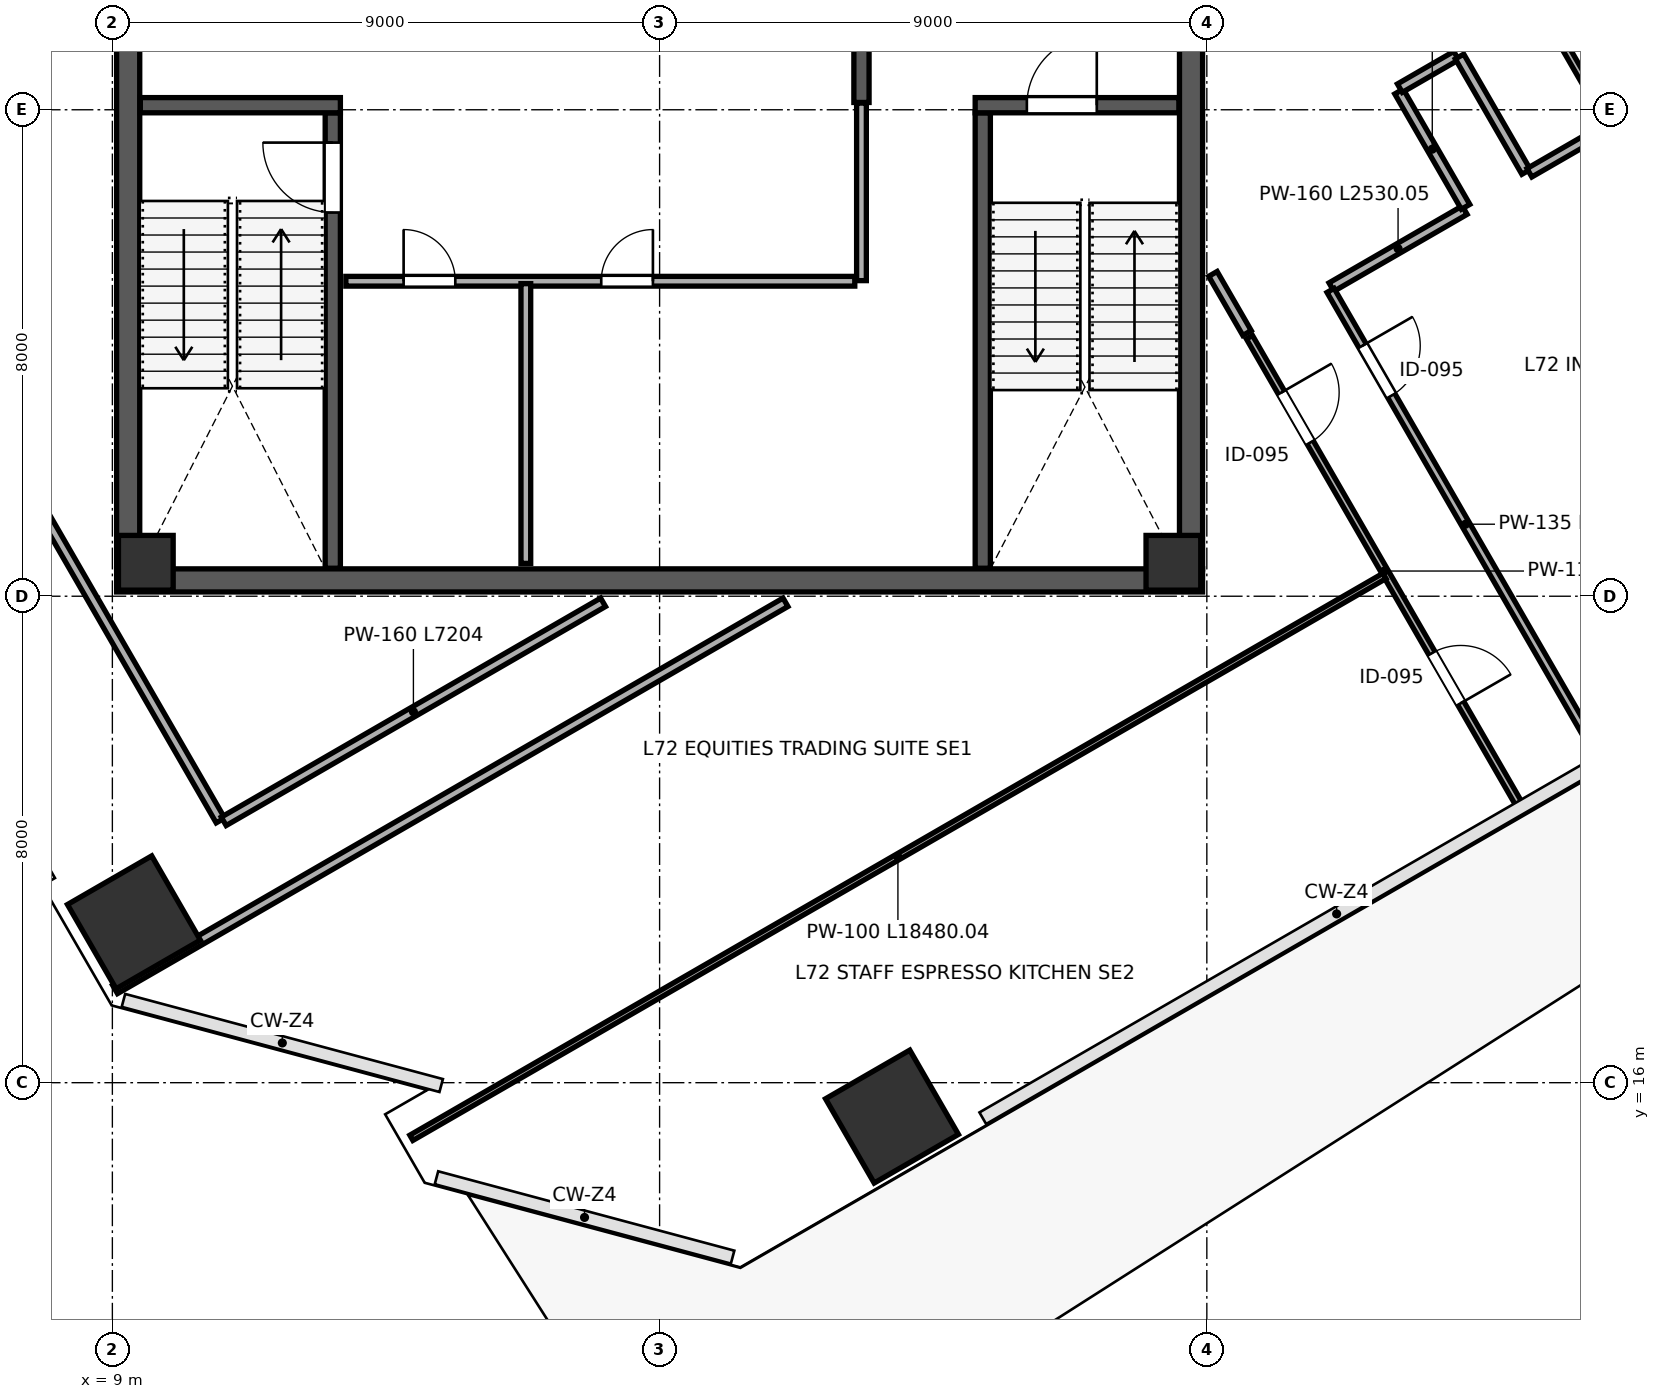
"""IFC4 building model, lengths in metres.
Left out: names, types, materials, properties, quantities, classifications, styles, units other than length and angle.
Written with IfcOpenShell. Run it as: python <this file> out.ifc"""

import sys

from ifc_helpers import new_model, si_unit, direction, frame, frame_2d, origin, origin_2d, place, context, subcontext, project, spatial, rectangle, extrude, source, transform, mapped, element, fill, save


model = new_model("IFC4")
c1 = context("Model", 3, precision=1e-05, world=origin(), true_north=direction((0.0, 1.0)))
c2 = subcontext(c1, "Body", "Model", "MODEL_VIEW")
j1 = project(units=[si_unit("LENGTHUNIT", "METRE"), si_unit("PLANEANGLEUNIT", "RADIAN")], contexts=[c1])
p1 = place(None, origin())
s1 = spatial("IfcSite", under=j1, at=p1, CompositionType="ELEMENT")
p2 = place(p1, origin())
s2 = spatial("IfcBuilding", under=s1, at=p2, CompositionType="ELEMENT")
p3 = place(p2, frame((0.0, 0.0, 319.8)))
s3 = spatial("IfcBuildingStorey", under=s2, at=p3, CompositionType="ELEMENT", Elevation=319.8)
m1 = source(origin(), c2, "Body", "SweptSolid", [
    extrude(rectangle(XDim=0.9, YDim=0.9, at=origin_2d()), origin(), (0.0, 0.0, 1.0), 4.198),
])
for number, where, z_axis, x_axis in (
    (1, (9.55, 24.55, 0.001), (0.0, 0.0, 1.0), (1.0, 0.0, 0.0)),
    (2, (26.45, 24.55, 0.001), (0.0, 0.0, 1.0), (1.0, 0.0, 0.0)),
):
    element("IfcColumn", number, at=place(p3, frame(where, z_axis=z_axis, x_axis=x_axis)), inside=s3, PredefinedType="COLUMN", context=c2, shape_type="MappedRepresentation", body=[
        mapped(m1, transform((0.0, 0.0, 0.0), scale=1.0)),
    ])
m2 = source(origin(), c2, "Body", "SweptSolid", [
    extrude(rectangle(XDim=1.6, YDim=1.6, at=origin_2d()), origin(), (0.0, 0.0, 1.0), 4.198),
])
for number, where, z_axis, x_axis in (
    (3, (9.354, 18.637, 0.001), (0.0, 0.0, 1.0), (-0.5, 0.866, 0.0)),
    (4, (21.822, 15.443, 0.001), (0.0, 0.0, 1.0), (-0.5, 0.866, 0.0)),
):
    element("IfcColumn", number, at=place(p3, frame(where, z_axis=z_axis, x_axis=x_axis)), inside=s3, PredefinedType="COLUMN", context=c2, shape_type="MappedRepresentation", body=[
        mapped(m2, transform((0.0, 0.0, 0.0), scale=1.0)),
    ])
p4 = place(p3, frame((9.26, 24.45, 0.0), z_axis=(0.0, 0.0, 1.0), x_axis=(0.0, 1.0, 0.0)))
e5 = element("IfcWall", 5, at=p4, inside=s3, PredefinedType="SHEAR", context=c2, shape_type="SweptSolid", body=[
    extrude(rectangle(XDim=15.1, YDim=0.38, at=frame_2d((7.55, 0.0))), origin(), (0.0, 0.0, 1.0), 3.96),
])
p5 = place(p4, frame((8.7, 0.0, 0.0)))
e6 = element("IfcOpeningElement", 6, at=p5, cuts=e5, PredefinedType="OPENING", context=c2, shape_type="SweptSolid", body=[
    extrude(rectangle(XDim=1.15, YDim=2.2, at=frame_2d((0.575, 1.1))), frame((0.0, 0.2, 0.0), z_axis=(0.0, -1.0, 0.0), x_axis=(1.0, 0.0, 0.0)), (0.0, 0.0, 1.0), 0.4),
])
p6 = place(p3, frame((26.74, 24.45, 0.0), z_axis=(0.0, 0.0, 1.0), x_axis=(0.0, 1.0, 0.0)))
e7 = element("IfcWall", 7, at=p6, inside=s3, PredefinedType="SHEAR", context=c2, shape_type="SweptSolid", body=[
    extrude(rectangle(XDim=15.1, YDim=0.38, at=frame_2d((7.55, 0.0))), origin(), (0.0, 0.0, 1.0), 3.96),
])
p7 = place(p6, frame((8.6, 0.0, 0.0)))
e8 = element("IfcOpeningElement", 8, at=p7, cuts=e7, PredefinedType="OPENING", context=c2, shape_type="SweptSolid", body=[
    extrude(rectangle(XDim=1.15, YDim=2.2, at=frame_2d((0.575, 1.1))), frame((0.0, 0.2, 0.0), z_axis=(0.0, -1.0, 0.0), x_axis=(1.0, 0.0, 0.0)), (0.0, 0.0, 1.0), 0.4),
])
p8 = place(p3, frame((9.07, 24.26, 0.0), z_axis=(0.0, 0.0, 1.0), x_axis=(1.0, 0.0, 0.0)))
e9 = element("IfcWall", 9, at=p8, inside=s3, PredefinedType="SHEAR", context=c2, shape_type="SweptSolid", body=[
    extrude(rectangle(XDim=17.86, YDim=0.38, at=frame_2d((8.93, 0.0))), origin(), (0.0, 0.0, 1.0), 3.96),
])
p9 = place(p3, frame((12.625, 24.46, 0.0), z_axis=(0.0, 0.0, 1.0), x_axis=(0.0, 1.0, 0.0)))
e10 = element("IfcWall", 10, at=p9, inside=s3, PredefinedType="SHEAR", context=c2, shape_type="SweptSolid", body=[
    extrude(rectangle(XDim=7.49, YDim=0.25, at=frame_2d((3.745, 0.0))), origin(), (0.0, 0.0, 1.0), 3.96),
])
p10 = place(p9, frame((5.85, 0.0, 0.0)))
e11 = element("IfcOpeningElement", 11, at=p10, cuts=e10, PredefinedType="OPENING", context=c2, shape_type="SweptSolid", body=[
    extrude(rectangle(XDim=1.15, YDim=2.2, at=frame_2d((0.575, 1.1))), frame((0.0, 0.135, 0.0), z_axis=(0.0, -1.0, 0.0), x_axis=(1.0, 0.0, 0.0)), (0.0, 0.0, 1.0), 0.27),
])
p11 = place(p3, frame((9.46, 32.075, 0.0), z_axis=(0.0, 0.0, 1.0), x_axis=(1.0, 0.0, 0.0)))
e12 = element("IfcWall", 12, at=p11, inside=s3, PredefinedType="SHEAR", context=c2, shape_type="SweptSolid", body=[
    extrude(rectangle(XDim=3.29, YDim=0.25, at=frame_2d((1.645, 0.0))), origin(), (0.0, 0.0, 1.0), 3.96),
])
p12 = place(p3, frame((23.315, 24.46, 0.0), z_axis=(0.0, 0.0, 1.0), x_axis=(0.0, 1.0, 0.0)))
e13 = element("IfcWall", 13, at=p12, inside=s3, PredefinedType="SHEAR", context=c2, shape_type="SweptSolid", body=[
    extrude(rectangle(XDim=7.49, YDim=0.25, at=frame_2d((3.745, 0.0))), origin(), (0.0, 0.0, 1.0), 3.96),
])
p13 = place(p3, frame((23.19, 32.075, 0.0), z_axis=(0.0, 0.0, 1.0), x_axis=(1.0, 0.0, 0.0)))
e14 = element("IfcWall", 14, at=p13, inside=s3, PredefinedType="SHEAR", context=c2, shape_type="SweptSolid", body=[
    extrude(rectangle(XDim=3.35, YDim=0.25, at=frame_2d((1.675, 0.0))), origin(), (0.0, 0.0, 1.0), 3.96),
])
p14 = place(p13, frame((0.85, 0.0, 0.0)))
e15 = element("IfcOpeningElement", 15, at=p14, cuts=e14, PredefinedType="OPENING", context=c2, shape_type="SweptSolid", body=[
    extrude(rectangle(XDim=1.15, YDim=2.2, at=frame_2d((0.575, 1.1))), frame((0.0, 0.135, 0.0), z_axis=(0.0, -1.0, 0.0), x_axis=(1.0, 0.0, 0.0)), (0.0, 0.0, 1.0), 0.27),
])
p15 = place(p3, frame((21.32, 32.12, 0.0), z_axis=(0.0, 0.0, 1.0), x_axis=(0.0, 1.0, 0.0)))
e16 = element("IfcWall", 16, at=p15, inside=s3, PredefinedType="SHEAR", context=c2, shape_type="SweptSolid", body=[
    extrude(rectangle(XDim=7.42, YDim=0.25, at=frame_2d((3.71, 0.0))), origin(), (0.0, 0.0, 1.0), 3.96),
])
p16 = place(p15, frame((1.4, 0.0, 0.0)))
e17 = element("IfcOpeningElement", 17, at=p16, cuts=e16, PredefinedType="OPENING", context=c2, shape_type="SweptSolid", body=[
    extrude(rectangle(XDim=1.15, YDim=2.2, at=frame_2d((0.575, 1.1))), frame((0.0, 0.135, 0.0), z_axis=(0.0, -1.0, 0.0), x_axis=(1.0, 0.0, 0.0)), (0.0, 0.0, 1.0), 0.27),
])
p17 = place(p3, frame((12.84, 29.18, 0.0), z_axis=(0.0, 0.0, 1.0), x_axis=(1.0, 0.0, 0.0)))
e18 = element("IfcWall", 18, at=p17, inside=s3, PredefinedType="PARTITIONING", context=c2, shape_type="SweptSolid", body=[
    extrude(rectangle(XDim=8.37, YDim=0.16, at=frame_2d((4.185, 0.0))), origin(), (0.0, 0.0, 1.0), 3.96),
])
p18 = place(p17, frame((0.95, 0.0, 0.0)))
e19 = element("IfcOpeningElement", 19, at=p18, cuts=e18, PredefinedType="OPENING", context=c2, shape_type="SweptSolid", body=[
    extrude(rectangle(XDim=0.85, YDim=2.1, at=frame_2d((0.425, 1.05))), frame((0.0, 0.09, 0.0), z_axis=(0.0, -1.0, 0.0), x_axis=(1.0, 0.0, 0.0)), (0.0, 0.0, 1.0), 0.18),
])
p19 = place(p17, frame((4.2, 0.0, 0.0)))
e20 = element("IfcOpeningElement", 20, at=p19, cuts=e18, PredefinedType="OPENING", context=c2, shape_type="SweptSolid", body=[
    extrude(rectangle(XDim=0.85, YDim=2.1, at=frame_2d((0.425, 1.05))), frame((0.0, 0.09, 0.0), z_axis=(0.0, -1.0, 0.0), x_axis=(1.0, 0.0, 0.0)), (0.0, 0.0, 1.0), 0.18),
])
p20 = place(p3, frame((15.8, 24.54, 0.0), z_axis=(0.0, 0.0, 1.0), x_axis=(0.0, 1.0, 0.0)))
e21 = element("IfcWall", 21, at=p20, inside=s3, PredefinedType="PARTITIONING", context=c2, shape_type="SweptSolid", body=[
    extrude(rectangle(XDim=4.6, YDim=0.16, at=frame_2d((2.3, 0.0))), origin(), (0.0, 0.0, 1.0), 3.96),
])
p21 = place(p3, frame((21.32, 29.19, 0.0), z_axis=(0.0, 0.0, 1.0), x_axis=(0.0, 1.0, 0.0)))
e22 = element("IfcWall", 22, at=p21, inside=s3, PredefinedType="PARTITIONING", context=c2, shape_type="SweptSolid", body=[
    extrude(rectangle(XDim=2.92, YDim=0.16, at=frame_2d((1.46, 0.0))), origin(), (0.0, 0.0, 1.0), 3.96),
])
p22 = place(p3, frame((3.742, 32.498, 0.0), z_axis=(0.0, 0.0, 1.0), x_axis=(0.500005830994, -0.866022037233, 0.0)))
e23 = element("IfcWall", 23, at=p22, inside=s3, PredefinedType="PARTITIONING", context=c2, shape_type="SweptSolid", body=[
    extrude(rectangle(XDim=14.07, YDim=0.16, at=frame_2d((7.035, 0.0))), origin(), (0.0, 0.0, 1.0), 3.96),
])
p23 = place(p22, frame((1.15, 0.0, 0.0)))
e24 = element("IfcOpeningElement", 24, at=p23, cuts=e23, PredefinedType="OPENING", context=c2, shape_type="SweptSolid", body=[
    extrude(rectangle(XDim=0.95, YDim=2.15, at=frame_2d((0.475, 1.075))), frame((0.0, 0.09, 0.0), z_axis=(0.0, -1.0, 0.0), x_axis=(1.0, 0.0, 0.0)), (0.0, 0.0, 1.0), 0.18),
])
p24 = place(p3, frame((10.832, 20.298, 0.0), z_axis=(0.0, 0.0, 1.0), x_axis=(0.866042809144, 0.499969851821, 0.0)))
e25 = element("IfcWall", 25, at=p24, inside=s3, PredefinedType="PARTITIONING", context=c2, shape_type="SweptSolid", body=[
    extrude(rectangle(XDim=7.204, YDim=0.16, at=frame_2d((3.602, 0.0))), origin(), (0.0, 0.0, 1.0), 3.96),
])
p25 = place(p3, frame((27.1, 29.301, 0.0), z_axis=(0.0, 0.0, 1.0), x_axis=(0.499929606556, -0.866066041644, 0.0)))
e26 = element("IfcWall", 26, at=p25, inside=s3, PredefinedType="PARTITIONING", context=c2, shape_type="SweptSolid", body=[
    extrude(rectangle(XDim=1.122, YDim=0.16, at=frame_2d((0.561, 0.0))), origin(), (0.0, 0.0, 1.0), 3.96),
])
p26 = place(p3, frame((23.284, 49.669, 0.0), z_axis=(0.0, 0.0, 1.0), x_axis=(0.500004637929, -0.866022726058, 0.0)))
e27 = element("IfcWall", 27, at=p26, inside=s3, PredefinedType="PARTITIONING", context=c2, shape_type="SweptSolid", body=[
    extrude(rectangle(XDim=20.67, YDim=0.115, at=frame_2d((10.335, 0.0))), origin(), (0.0, 0.0, 1.0), 3.96),
])
p27 = place(p26, frame((1.05, 0.0, 0.0)))
e28 = element("IfcOpeningElement", 28, at=p27, cuts=e27, PredefinedType="OPENING", context=c2, shape_type="SweptSolid", body=[
    extrude(rectangle(XDim=0.95, YDim=2.15, at=frame_2d((0.475, 1.075))), frame((0.0, 0.067, 0.0), z_axis=(0.0, -1.0, 0.0), x_axis=(1.0, 0.0, 0.0)), (0.0, 0.0, 1.0), 0.135),
])
p28 = place(p26, frame((8.2, 0.0, 0.0)))
e29 = element("IfcOpeningElement", 29, at=p28, cuts=e27, PredefinedType="OPENING", context=c2, shape_type="SweptSolid", body=[
    extrude(rectangle(XDim=0.95, YDim=2.15, at=frame_2d((0.475, 1.075))), frame((0.0, 0.067, 0.0), z_axis=(0.0, -1.0, 0.0), x_axis=(1.0, 0.0, 0.0)), (0.0, 0.0, 1.0), 0.135),
])
p29 = place(p3, frame((29.049, 29.084, 0.0), z_axis=(0.0, 0.0, 1.0), x_axis=(0.866013648801, 0.500020359676, 0.0)))
e30 = element("IfcWall", 30, at=p29, inside=s3, PredefinedType="PARTITIONING", context=c2, shape_type="SweptSolid", body=[
    extrude(rectangle(XDim=2.53, YDim=0.16, at=frame_2d((1.265, 0.0))), origin(), (0.0, 0.0, 1.0), 3.96),
])
p30 = place(p3, frame((30.16, 32.3, 0.0), z_axis=(0.0, 0.0, 1.0), x_axis=(0.499963694393, -0.866046363822, 0.0)))
e31 = element("IfcWall", 31, at=p30, inside=s3, PredefinedType="PARTITIONING", context=c2, shape_type="SweptSolid", body=[
    extrude(rectangle(XDim=2.19, YDim=0.16, at=frame_2d((1.095, 0.0))), origin(), (0.0, 0.0, 1.0), 3.96),
])
p31 = place(p3, frame((30.175, 32.355, 0.0), z_axis=(0.0, 0.0, 1.0), x_axis=(0.866029778435, 0.499992422807, 0.0)))
e32 = element("IfcWall", 32, at=p31, inside=s3, PredefinedType="PARTITIONING", context=c2, shape_type="SweptSolid", body=[
    extrude(rectangle(XDim=1.07, YDim=0.16, at=frame_2d((0.535, 0.0))), origin(), (0.0, 0.0, 1.0), 3.96),
])
p32 = place(p3, frame((31.156, 32.875, 0.0), z_axis=(0.0, 0.0, 1.0), x_axis=(0.499963694393, -0.866046363822, 0.0)))
e33 = element("IfcWall", 33, at=p32, inside=s3, PredefinedType="PARTITIONING", context=c2, shape_type="SweptSolid", body=[
    extrude(rectangle(XDim=2.19, YDim=0.16, at=frame_2d((1.095, 0.0))), origin(), (0.0, 0.0, 1.0), 3.96),
])
p33 = place(p3, frame((32.306, 30.964, 0.0), z_axis=(0.0, 0.0, 1.0), x_axis=(0.866033266336, 0.499986381413, 0.0)))
e34 = element("IfcWall", 34, at=p33, inside=s3, PredefinedType="PARTITIONING", context=c2, shape_type="SweptSolid", body=[
    extrude(rectangle(XDim=7.18, YDim=0.16, at=frame_2d((3.59, 0.0))), origin(), (0.0, 0.0, 1.0), 3.96),
])
p34 = place(p3, frame((9.044, 17.534, 0.0), z_axis=(0.0, 0.0, 1.0), x_axis=(0.866029119881, 0.499993563477, 0.0)))
e35 = element("IfcWall", 35, at=p34, inside=s3, PredefinedType="PARTITIONING", context=c2, shape_type="SweptSolid", body=[
    extrude(rectangle(XDim=12.732, YDim=0.16, at=frame_2d((6.366, 0.0))), origin(), (0.0, 0.0, 1.0), 3.96),
])
p35 = place(p3, frame((29.035, 29.029, 0.0), z_axis=(0.0, 0.0, 1.0), x_axis=(0.500000904628, -0.866024881496, 0.0)))
e36 = element("IfcWall", 36, at=p35, inside=s3, PredefinedType="PARTITIONING", context=c2, shape_type="SweptSolid", body=[
    extrude(rectangle(XDim=8.88, YDim=0.135, at=frame_2d((4.44, 0.0))), origin(), (0.0, 0.0, 1.0), 3.96),
])
p36 = place(p35, frame((1.05, 0.0, 0.0)))
e37 = element("IfcOpeningElement", 37, at=p36, cuts=e36, PredefinedType="OPENING", context=c2, shape_type="SweptSolid", body=[
    extrude(rectangle(XDim=0.95, YDim=2.15, at=frame_2d((0.475, 1.075))), frame((0.0, 0.078, 0.0), z_axis=(0.0, -1.0, 0.0), x_axis=(1.0, 0.0, 0.0)), (0.0, 0.0, 1.0), 0.155),
])
p37 = place(p3, frame((27.701, 28.26, 0.0), z_axis=(0.0, 0.0, 1.0), x_axis=(0.499988999718, -0.866031754707, 0.0)))
e38 = element("IfcWall", 38, at=p37, inside=s3, PredefinedType="PARTITIONING", context=c2, shape_type="SweptSolid", body=[
    extrude(rectangle(XDim=8.88, YDim=0.115, at=frame_2d((4.44, 0.0))), origin(), (0.0, 0.0, 1.0), 3.96),
])
p38 = place(p37, frame((1.05, 0.0, 0.0)))
e39 = element("IfcOpeningElement", 39, at=p38, cuts=e38, PredefinedType="OPENING", context=c2, shape_type="SweptSolid", body=[
    extrude(rectangle(XDim=0.95, YDim=2.15, at=frame_2d((0.475, 1.075))), frame((0.0, 0.067, 0.0), z_axis=(0.0, -1.0, 0.0), x_axis=(1.0, 0.0, 0.0)), (0.0, 0.0, 1.0), 0.135),
])
p39 = place(p37, frame((6.0, 0.0, 0.0)))
e40 = element("IfcOpeningElement", 40, at=p39, cuts=e38, PredefinedType="OPENING", context=c2, shape_type="SweptSolid", body=[
    extrude(rectangle(XDim=0.95, YDim=2.15, at=frame_2d((0.475, 1.075))), frame((0.0, 0.067, 0.0), z_axis=(0.0, -1.0, 0.0), x_axis=(1.0, 0.0, 0.0)), (0.0, 0.0, 1.0), 0.135),
])
p40 = place(p3, frame((13.917, 15.094, 0.0), z_axis=(0.0, 0.0, 1.0), x_axis=(0.86602564517, 0.499999581907, 0.0)))
e41 = element("IfcWall", 41, at=p40, inside=s3, PredefinedType="PARTITIONING", context=c2, shape_type="SweptSolid", body=[
    extrude(rectangle(XDim=18.48, YDim=0.1, at=frame_2d((9.24, 0.0))), origin(), (0.0, 0.0, 1.0), 3.96),
])
m3 = source(origin(), c2, "Body", "SweptSolid", [
    extrude(rectangle(XDim=1.15, YDim=2.2, at=frame_2d((0.575, 1.1))), frame((0.0, 0.025, 0.0), z_axis=(0.0, -1.0, 0.0), x_axis=(1.0, 0.0, 0.0)), (0.0, 0.0, 1.0), 0.05),
])
p41 = place(p10, origin())
e42 = element("IfcDoor", 42, at=p41, inside=s3, OperationType="SINGLE_SWING_RIGHT", PredefinedType="DOOR", context=c2, shape_type="MappedRepresentation", body=[
    mapped(m3, transform((0.0, 0.0, 0.0), scale=1.0)),
])
fill(e11, e42)
p42 = place(p14, origin())
e43 = element("IfcDoor", 43, at=p42, inside=s3, OperationType="SINGLE_SWING_RIGHT", PredefinedType="DOOR", context=c2, shape_type="MappedRepresentation", body=[
    mapped(m3, transform((0.0, 0.0, 0.0), scale=1.0)),
])
fill(e15, e43)
m4 = source(origin(), c2, "Body", "SweptSolid", [
    extrude(rectangle(XDim=0.85, YDim=2.1, at=frame_2d((0.425, 1.05))), frame((0.0, 0.025, 0.0), z_axis=(0.0, -1.0, 0.0), x_axis=(1.0, 0.0, 0.0)), (0.0, 0.0, 1.0), 0.05),
])
p43 = place(p18, origin())
e44 = element("IfcDoor", 44, at=p43, inside=s3, OperationType="SINGLE_SWING_LEFT", PredefinedType="DOOR", context=c2, shape_type="MappedRepresentation", body=[
    mapped(m4, transform((0.0, 0.0, 0.0), scale=1.0)),
])
fill(e19, e44)
p44 = place(p19, origin())
e45 = element("IfcDoor", 45, at=p44, inside=s3, OperationType="SINGLE_SWING_RIGHT", PredefinedType="DOOR", context=c2, shape_type="MappedRepresentation", body=[
    mapped(m4, transform((0.0, 0.0, 0.0), scale=1.0)),
])
fill(e20, e45)
m5 = source(origin(), c2, "Body", "SweptSolid", [
    extrude(rectangle(XDim=0.95, YDim=2.15, at=frame_2d((0.475, 1.075))), frame((0.0, 0.025, 0.0), z_axis=(0.0, -1.0, 0.0), x_axis=(1.0, 0.0, 0.0)), (0.0, 0.0, 1.0), 0.05),
])
p45 = place(p36, origin())
e46 = element("IfcDoor", 46, at=p45, inside=s3, OperationType="SINGLE_SWING_LEFT", PredefinedType="DOOR", context=c2, shape_type="MappedRepresentation", body=[
    mapped(m5, transform((0.0, 0.0, 0.0), scale=1.0)),
])
fill(e37, e46)
p46 = place(p38, origin())
e47 = element("IfcDoor", 47, at=p46, inside=s3, OperationType="SINGLE_SWING_LEFT", PredefinedType="DOOR", context=c2, shape_type="MappedRepresentation", body=[
    mapped(m5, transform((0.0, 0.0, 0.0), scale=1.0)),
])
fill(e39, e47)
p47 = place(p39, origin())
e48 = element("IfcDoor", 48, at=p47, inside=s3, OperationType="SINGLE_SWING_RIGHT", PredefinedType="DOOR", context=c2, shape_type="MappedRepresentation", body=[
    mapped(m5, transform((0.0, 0.0, 0.0), scale=1.0)),
])
fill(e40, e48)
save(model, sys.argv[1])
